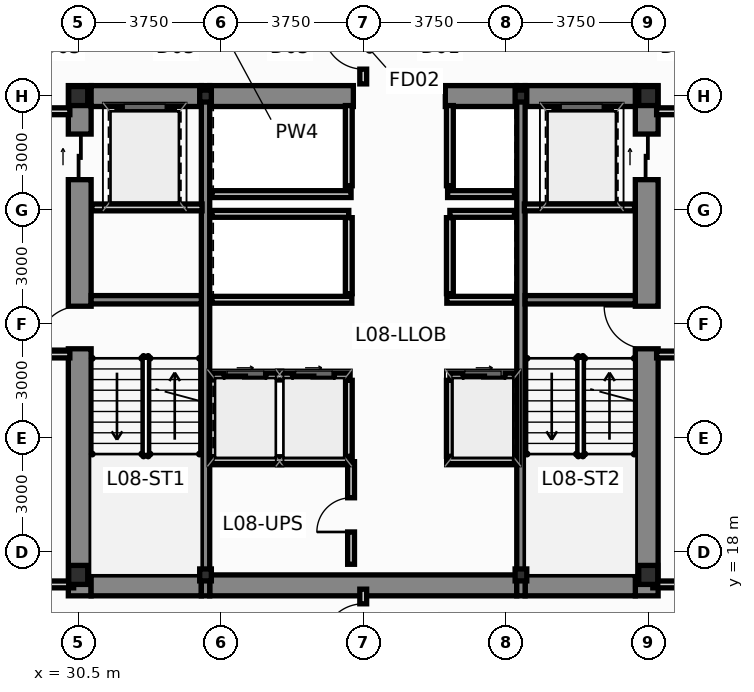
"""IFC4 building model, lengths in metres.
Left out: names, types, materials, properties, quantities, classifications, styles, units other than length and angle.
Written with IfcOpenShell. Run it as: python <this file> out.ifc"""

import sys

from ifc_helpers import new_model, si_unit, direction, frame, frame_2d, origin, origin_2d, place, context, subcontext, project, spatial, rectangle, i_section, extrude, source, transform, mapped, element, fill, save


model = new_model("IFC4")
c1 = context("Model", 3, precision=1e-05, world=origin(), true_north=direction((0.0, 1.0)))
c2 = subcontext(c1, "Body", "Model", "MODEL_VIEW")
j1 = project(units=[si_unit("LENGTHUNIT", "METRE"), si_unit("PLANEANGLEUNIT", "RADIAN")], contexts=[c1])
p1 = place(None, origin())
s1 = spatial("IfcSite", under=j1, at=p1, CompositionType="ELEMENT")
p2 = place(p1, origin())
s2 = spatial("IfcBuilding", under=s1, at=p2, CompositionType="ELEMENT")
p3 = place(p2, frame((0.0, 0.0, 34.9)))
s3 = spatial("IfcBuildingStorey", under=s2, at=p3, CompositionType="ELEMENT", Elevation=34.9)
m1 = source(origin(), c2, "Body", "SweptSolid", [
    extrude(i_section(OverallWidth=0.5, OverallDepth=0.5, WebThickness=0.028, FlangeThickness=0.04, at=origin_2d()), origin(), (0.0, 0.0, 1.0), 3.65),
])
for number, where, z_axis, x_axis in (
    (1, (30.5, 17.4, 0.0), (0.0, 0.0, 1.0), (1.0, 0.0, 0.0)),
    (2, (45.5, 17.4, 0.0), (0.0, 0.0, 1.0), (1.0, 0.0, 0.0)),
    (3, (45.5, 30.0, 0.0), (0.0, 0.0, 1.0), (1.0, 0.0, 0.0)),
    (4, (30.5, 30.0, 0.0), (0.0, 0.0, 1.0), (1.0, 0.0, 0.0)),
):
    element("IfcColumn", number, at=place(p3, frame(where, z_axis=z_axis, x_axis=x_axis)), inside=s3, PredefinedType="COLUMN", context=c2, shape_type="MappedRepresentation", body=[
        mapped(m1, transform((0.0, 0.0, 0.0), scale=1.0)),
    ])
m2 = source(origin(), c2, "Body", "SweptSolid", [
    extrude(i_section(OverallWidth=0.307, OverallDepth=0.315, WebThickness=0.012, FlangeThickness=0.019, at=origin_2d()), origin(), (0.0, 0.0, 1.0), 3.65),
])
for number, where, z_axis, x_axis in (
    (5, (33.85, 17.4, 0.0), (0.0, 0.0, 1.0), (1.0, 0.0, 0.0)),
    (6, (42.15, 17.4, 0.0), (0.0, 0.0, 1.0), (1.0, 0.0, 0.0)),
    (7, (33.85, 30.0, 0.0), (0.0, 0.0, 1.0), (1.0, 0.0, 0.0)),
    (8, (42.15, 30.0, 0.0), (0.0, 0.0, 1.0), (1.0, 0.0, 0.0)),
):
    element("IfcColumn", number, at=place(p3, frame(where, z_axis=z_axis, x_axis=x_axis)), inside=s3, PredefinedType="COLUMN", context=c2, shape_type="MappedRepresentation", body=[
        mapped(m2, transform((0.0, 0.0, 0.0), scale=1.0)),
    ])
p4 = place(p3, frame((30.54, 16.85, 0.0), z_axis=(0.0, 0.0, 1.0), x_axis=(0.0, 1.0, 0.0)))
e9 = element("IfcWall", 9, at=p4, inside=s3, PredefinedType="SHEAR", context=c2, shape_type="SweptSolid", body=[
    extrude(rectangle(XDim=13.425, YDim=0.6, at=frame_2d((6.712, 0.0))), origin(), (0.0, 0.0, 1.0), 3.65),
])
p5 = place(p4, frame((6.5, 0.0, 0.0)))
e10 = element("IfcOpeningElement", 10, at=p5, cuts=e9, PredefinedType="OPENING", context=c2, shape_type="SweptSolid", body=[
    extrude(rectangle(XDim=1.12, YDim=2.15, at=frame_2d((0.56, 1.075))), frame((0.0, 0.312, 0.0), z_axis=(0.0, -1.0, 0.0), x_axis=(1.0, 0.0, 0.0)), (0.0, 0.0, 1.0), 0.624),
])
p6 = place(p4, frame((10.95, 0.0, 0.0)))
e11 = element("IfcOpeningElement", 11, at=p6, cuts=e9, PredefinedType="OPENING", context=c2, shape_type="SweptSolid", body=[
    extrude(rectangle(XDim=1.2, YDim=2.2, at=frame_2d((0.6, 1.1))), frame((0.0, 0.312, 0.0), z_axis=(0.0, -1.0, 0.0), x_axis=(1.0, 0.0, 0.0)), (0.0, 0.0, 1.0), 0.624),
])
p7 = place(p3, frame((45.46, 16.85, 0.0), z_axis=(0.0, 0.0, 1.0), x_axis=(0.0, 1.0, 0.0)))
e12 = element("IfcWall", 12, at=p7, inside=s3, PredefinedType="SHEAR", context=c2, shape_type="SweptSolid", body=[
    extrude(rectangle(XDim=13.425, YDim=0.6, at=frame_2d((6.712, 0.0))), origin(), (0.0, 0.0, 1.0), 3.65),
])
p8 = place(p7, frame((6.5, 0.0, 0.0)))
e13 = element("IfcOpeningElement", 13, at=p8, cuts=e12, PredefinedType="OPENING", context=c2, shape_type="SweptSolid", body=[
    extrude(rectangle(XDim=1.12, YDim=2.15, at=frame_2d((0.56, 1.075))), frame((0.0, 0.312, 0.0), z_axis=(0.0, -1.0, 0.0), x_axis=(1.0, 0.0, 0.0)), (0.0, 0.0, 1.0), 0.624),
])
p9 = place(p7, frame((10.95, 0.0, 0.0)))
e14 = element("IfcOpeningElement", 14, at=p9, cuts=e12, PredefinedType="OPENING", context=c2, shape_type="SweptSolid", body=[
    extrude(rectangle(XDim=1.2, YDim=2.2, at=frame_2d((0.6, 1.1))), frame((0.0, 0.312, 0.0), z_axis=(0.0, -1.0, 0.0), x_axis=(1.0, 0.0, 0.0)), (0.0, 0.0, 1.0), 0.624),
])
p10 = place(p3, frame((30.84, 17.125, 0.0), z_axis=(0.0, 0.0, 1.0), x_axis=(1.0, 0.0, 0.0)))
e15 = element("IfcWall", 15, at=p10, inside=s3, PredefinedType="SHEAR", context=c2, shape_type="SweptSolid", body=[
    extrude(rectangle(XDim=2.9, YDim=0.55, at=frame_2d((1.45, 0.0))), origin(), (0.0, 0.0, 1.0), 3.65),
])
p11 = place(p3, frame((33.96, 17.125, 0.0), z_axis=(0.0, 0.0, 1.0), x_axis=(1.0, 0.0, 0.0)))
e16 = element("IfcWall", 16, at=p11, inside=s3, PredefinedType="SHEAR", context=c2, shape_type="SweptSolid", body=[
    extrude(rectangle(XDim=8.08, YDim=0.55, at=frame_2d((4.04, 0.0))), origin(), (0.0, 0.0, 1.0), 3.65),
])
for number, where, z_axis, x_axis in (
    (17, (42.26, 17.125, 0.0), (0.0, 0.0, 1.0), (1.0, 0.0, 0.0)),
    (18, (30.84, 30.0, 0.0), (0.0, 0.0, 1.0), (1.0, 0.0, 0.0)),
):
    element("IfcWall", number, at=place(p3, frame(where, z_axis=z_axis, x_axis=x_axis)), inside=s3, PredefinedType="SHEAR", context=c2, shape_type="SweptSolid", body=[
        extrude(rectangle(XDim=2.9, YDim=0.55, at=frame_2d((1.45, 0.0))), origin(), (0.0, 0.0, 1.0), 3.65),
    ])
p12 = place(p3, frame((33.96, 30.0, 0.0), z_axis=(0.0, 0.0, 1.0), x_axis=(1.0, 0.0, 0.0)))
e19 = element("IfcWall", 19, at=p12, inside=s3, PredefinedType="SHEAR", context=c2, shape_type="SweptSolid", body=[
    extrude(rectangle(XDim=3.78, YDim=0.55, at=frame_2d((1.89, 0.0))), origin(), (0.0, 0.0, 1.0), 3.65),
])
p13 = place(p3, frame((40.16, 30.0, 0.0), z_axis=(0.0, 0.0, 1.0), x_axis=(1.0, 0.0, 0.0)))
e20 = element("IfcWall", 20, at=p13, inside=s3, PredefinedType="SHEAR", context=c2, shape_type="SweptSolid", body=[
    extrude(rectangle(XDim=1.88, YDim=0.55, at=frame_2d((0.94, 0.0))), origin(), (0.0, 0.0, 1.0), 3.65),
])
p14 = place(p3, frame((42.26, 30.0, 0.0), z_axis=(0.0, 0.0, 1.0), x_axis=(1.0, 0.0, 0.0)))
e21 = element("IfcWall", 21, at=p14, inside=s3, PredefinedType="SHEAR", context=c2, shape_type="SweptSolid", body=[
    extrude(rectangle(XDim=2.9, YDim=0.55, at=frame_2d((1.45, 0.0))), origin(), (0.0, 0.0, 1.0), 3.65),
])
for number, where, z_axis, x_axis in (
    (22, (33.85, 16.85, 0.0), (0.0, 0.0, 1.0), (0.0, 1.0, 0.0)),
    (23, (42.15, 16.85, 0.0), (0.0, 0.0, 1.0), (0.0, 1.0, 0.0)),
):
    element("IfcWall", number, at=place(p3, frame(where, z_axis=z_axis, x_axis=x_axis)), inside=s3, PredefinedType="SHEAR", context=c2, shape_type="SweptSolid", body=[
        extrude(rectangle(XDim=13.425, YDim=0.22, at=frame_2d((6.712, 0.0))), origin(), (0.0, 0.0, 1.0), 3.65),
    ])
for number, where, z_axis, x_axis in (
    (24, (30.84, 24.64, 0.0), (0.0, 0.0, 1.0), (1.0, 0.0, 0.0)),
    (25, (42.26, 24.64, 0.0), (0.0, 0.0, 1.0), (1.0, 0.0, 0.0)),
):
    element("IfcWall", number, at=place(p3, frame(where, z_axis=z_axis, x_axis=x_axis)), inside=s3, PredefinedType="SHEAR", context=c2, shape_type="SweptSolid", body=[
        extrude(rectangle(XDim=2.9, YDim=0.22, at=frame_2d((1.45, 0.0))), origin(), (0.0, 0.0, 1.0), 3.65),
    ])
p15 = place(p3, frame((34.02, 22.62, 0.0), z_axis=(0.0, 0.0, 1.0), x_axis=(1.0, 0.0, 0.0)))
e26 = element("IfcWall", 26, at=p15, inside=s3, PredefinedType="PARTITIONING", context=c2, shape_type="SweptSolid", body=[
    extrude(rectangle(XDim=3.6, YDim=0.18, at=frame_2d((1.8, 0.0))), origin(), (0.0, 0.0, 1.0), 3.4),
])
p16 = place(p15, frame((0.32, 0.0, 0.0)))
e27 = element("IfcOpeningElement", 27, at=p16, cuts=e26, PredefinedType="OPENING", context=c2, shape_type="SweptSolid", body=[
    extrude(rectangle(XDim=1.1, YDim=2.2, at=frame_2d((0.55, 1.1))), frame((0.0, 0.102, 0.0), z_axis=(0.0, -1.0, 0.0), x_axis=(1.0, 0.0, 0.0)), (0.0, 0.0, 1.0), 0.204),
])
p17 = place(p15, frame((2.12, 0.0, 0.0)))
e28 = element("IfcOpeningElement", 28, at=p17, cuts=e26, PredefinedType="OPENING", context=c2, shape_type="SweptSolid", body=[
    extrude(rectangle(XDim=1.1, YDim=2.2, at=frame_2d((0.55, 1.1))), frame((0.0, 0.102, 0.0), z_axis=(0.0, -1.0, 0.0), x_axis=(1.0, 0.0, 0.0)), (0.0, 0.0, 1.0), 0.204),
])
p18 = place(p3, frame((40.28, 22.62, 0.0), z_axis=(0.0, 0.0, 1.0), x_axis=(1.0, 0.0, 0.0)))
e29 = element("IfcWall", 29, at=p18, inside=s3, PredefinedType="PARTITIONING", context=c2, shape_type="SweptSolid", body=[
    extrude(rectangle(XDim=1.7, YDim=0.18, at=frame_2d((0.85, 0.0))), origin(), (0.0, 0.0, 1.0), 3.4),
])
p19 = place(p18, frame((0.35, 0.0, 0.0)))
e30 = element("IfcOpeningElement", 30, at=p19, cuts=e29, PredefinedType="OPENING", context=c2, shape_type="SweptSolid", body=[
    extrude(rectangle(XDim=1.1, YDim=2.2, at=frame_2d((0.55, 1.1))), frame((0.0, 0.102, 0.0), z_axis=(0.0, -1.0, 0.0), x_axis=(1.0, 0.0, 0.0)), (0.0, 0.0, 1.0), 0.204),
])
for number, where, z_axis, x_axis in (
    (31, (37.62, 20.52, 0.0), (0.0, 0.0, 1.0), (0.0, 1.0, 0.0)),
    (32, (40.28, 20.52, 0.0), (0.0, 0.0, 1.0), (0.0, 1.0, 0.0)),
):
    element("IfcWall", number, at=place(p3, frame(where, z_axis=z_axis, x_axis=x_axis)), inside=s3, PredefinedType="PARTITIONING", context=c2, shape_type="SweptSolid", body=[
        extrude(rectangle(XDim=2.0, YDim=0.18, at=frame_2d((1.0, 0.0))), origin(), (0.0, 0.0, 1.0), 3.4),
    ])
p20 = place(p3, frame((34.02, 26.9, 0.0), z_axis=(0.0, 0.0, 1.0), x_axis=(1.0, 0.0, 0.0)))
e33 = element("IfcWall", 33, at=p20, inside=s3, PredefinedType="PARTITIONING", context=c2, shape_type="SweptSolid", body=[
    extrude(rectangle(XDim=3.6, YDim=0.18, at=frame_2d((1.8, 0.0))), origin(), (0.0, 0.0, 1.0), 3.4),
])
p21 = place(p3, frame((40.28, 26.9, 0.0), z_axis=(0.0, 0.0, 1.0), x_axis=(1.0, 0.0, 0.0)))
e34 = element("IfcWall", 34, at=p21, inside=s3, PredefinedType="PARTITIONING", context=c2, shape_type="SweptSolid", body=[
    extrude(rectangle(XDim=1.7, YDim=0.18, at=frame_2d((0.85, 0.0))), origin(), (0.0, 0.0, 1.0), 3.4),
])
for number, where, z_axis, x_axis in (
    (35, (37.62, 24.8, 0.0), (0.0, 0.0, 1.0), (0.0, 1.0, 0.0)),
    (36, (40.28, 24.8, 0.0), (0.0, 0.0, 1.0), (0.0, 1.0, 0.0)),
):
    element("IfcWall", number, at=place(p3, frame(where, z_axis=z_axis, x_axis=x_axis)), inside=s3, PredefinedType="PARTITIONING", context=c2, shape_type="SweptSolid", body=[
        extrude(rectangle(XDim=2.0, YDim=0.18, at=frame_2d((1.0, 0.0))), origin(), (0.0, 0.0, 1.0), 3.4),
    ])
p22 = place(p3, frame((34.02, 24.64, 0.0), z_axis=(0.0, 0.0, 1.0), x_axis=(1.0, 0.0, 0.0)))
e37 = element("IfcWall", 37, at=p22, inside=s3, PredefinedType="PARTITIONING", context=c2, shape_type="SweptSolid", body=[
    extrude(rectangle(XDim=3.68, YDim=0.18, at=frame_2d((1.84, 0.0))), origin(), (0.0, 0.0, 1.0), 3.4),
])
p23 = place(p3, frame((40.2, 24.64, 0.0), z_axis=(0.0, 0.0, 1.0), x_axis=(1.0, 0.0, 0.0)))
e38 = element("IfcWall", 38, at=p23, inside=s3, PredefinedType="PARTITIONING", context=c2, shape_type="SweptSolid", body=[
    extrude(rectangle(XDim=1.78, YDim=0.18, at=frame_2d((0.89, 0.0))), origin(), (0.0, 0.0, 1.0), 3.4),
])
p24 = place(p3, frame((34.02, 27.42, 0.0), z_axis=(0.0, 0.0, 1.0), x_axis=(1.0, 0.0, 0.0)))
e39 = element("IfcWall", 39, at=p24, inside=s3, PredefinedType="PARTITIONING", context=c2, shape_type="SweptSolid", body=[
    extrude(rectangle(XDim=3.66, YDim=0.18, at=frame_2d((1.83, 0.0))), origin(), (0.0, 0.0, 1.0), 3.4),
])
p25 = place(p3, frame((40.22, 27.42, 0.0), z_axis=(0.0, 0.0, 1.0), x_axis=(1.0, 0.0, 0.0)))
e40 = element("IfcWall", 40, at=p25, inside=s3, PredefinedType="PARTITIONING", context=c2, shape_type="SweptSolid", body=[
    extrude(rectangle(XDim=1.76, YDim=0.18, at=frame_2d((0.88, 0.0))), origin(), (0.0, 0.0, 1.0), 3.4),
])
for number, where, z_axis, x_axis in (
    (41, (37.62, 27.64, 0.0), (0.0, 0.0, 1.0), (0.0, 1.0, 0.0)),
    (42, (40.28, 27.64, 0.0), (0.0, 0.0, 1.0), (0.0, 1.0, 0.0)),
):
    element("IfcWall", number, at=place(p3, frame(where, z_axis=z_axis, x_axis=x_axis)), inside=s3, PredefinedType="PARTITIONING", context=c2, shape_type="SweptSolid", body=[
        extrude(rectangle(XDim=2.11, YDim=0.18, at=frame_2d((1.055, 0.0))), origin(), (0.0, 0.0, 1.0), 3.4),
    ])
p26 = place(p3, frame((27.52, 23.2, 0.0), z_axis=(0.0, 0.0, 1.0), x_axis=(1.0, 0.0, 0.0)))
e43 = element("IfcWall", 43, at=p26, inside=s3, PredefinedType="PARTITIONING", context=c2, shape_type="SweptSolid", body=[
    extrude(rectangle(XDim=2.76, YDim=0.18, at=frame_2d((1.38, 0.0))), origin(), (0.0, 0.0, 1.0), 3.4),
])
p27 = place(p3, frame((27.52, 29.6, 0.0), z_axis=(0.0, 0.0, 1.0), x_axis=(1.0, 0.0, 0.0)))
e44 = element("IfcWall", 44, at=p27, inside=s3, PredefinedType="PARTITIONING", context=c2, shape_type="SweptSolid", body=[
    extrude(rectangle(XDim=2.76, YDim=0.18, at=frame_2d((1.38, 0.0))), origin(), (0.0, 0.0, 1.0), 2.783),
])
p28 = place(p3, frame((45.72, 23.2, 0.0), z_axis=(0.0, 0.0, 1.0), x_axis=(1.0, 0.0, 0.0)))
e45 = element("IfcWall", 45, at=p28, inside=s3, PredefinedType="PARTITIONING", context=c2, shape_type="SweptSolid", body=[
    extrude(rectangle(XDim=2.76, YDim=0.18, at=frame_2d((1.38, 0.0))), origin(), (0.0, 0.0, 1.0), 3.4),
])
p29 = place(p3, frame((45.72, 29.6, 0.0), z_axis=(0.0, 0.0, 1.0), x_axis=(1.0, 0.0, 0.0)))
e46 = element("IfcWall", 46, at=p29, inside=s3, PredefinedType="PARTITIONING", context=c2, shape_type="SweptSolid", body=[
    extrude(rectangle(XDim=2.76, YDim=0.18, at=frame_2d((1.38, 0.0))), origin(), (0.0, 0.0, 1.0), 2.783),
])
for number, where, z_axis, x_axis in (
    (47, (30.86, 27.07, 0.0), (0.0, 0.0, 1.0), (1.0, 0.0, 0.0)),
    (48, (42.24, 27.07, 0.0), (0.0, 0.0, 1.0), (1.0, 0.0, 0.0)),
):
    element("IfcWall", number, at=place(p3, frame(where, z_axis=z_axis, x_axis=x_axis)), inside=s3, PredefinedType="PARTITIONING", context=c2, shape_type="SweptSolid", body=[
        extrude(rectangle(XDim=2.9, YDim=0.18, at=frame_2d((1.45, 0.0))), origin(), (0.0, 0.0, 1.0), 3.4),
    ])
p30 = place(p3, frame((34.02, 20.42, 0.0), z_axis=(0.0, 0.0, 1.0), x_axis=(1.0, 0.0, 0.0)))
e49 = element("IfcWall", 49, at=p30, inside=s3, PredefinedType="PARTITIONING", context=c2, shape_type="SweptSolid", body=[
    extrude(rectangle(XDim=3.64, YDim=0.18, at=frame_2d((1.82, 0.0))), origin(), (0.0, 0.0, 1.0), 3.4),
])
p31 = place(p3, frame((40.22, 20.42, 0.0), z_axis=(0.0, 0.0, 1.0), x_axis=(1.0, 0.0, 0.0)))
e50 = element("IfcWall", 50, at=p31, inside=s3, PredefinedType="PARTITIONING", context=c2, shape_type="SweptSolid", body=[
    extrude(rectangle(XDim=1.76, YDim=0.18, at=frame_2d((0.88, 0.0))), origin(), (0.0, 0.0, 1.0), 3.4),
])
p32 = place(p3, frame((37.68, 17.68, 0.0), z_axis=(0.0, 0.0, 1.0), x_axis=(0.0, 1.0, 0.0)))
e51 = element("IfcWall", 51, at=p32, inside=s3, PredefinedType="PARTITIONING", context=c2, shape_type="SweptSolid", body=[
    extrude(rectangle(XDim=2.7, YDim=0.18, at=frame_2d((1.35, 0.0))), origin(), (0.0, 0.0, 1.0), 3.4),
])
p33 = place(p32, frame((0.85, 0.0, 0.0)))
e52 = element("IfcOpeningElement", 52, at=p33, cuts=e51, PredefinedType="OPENING", context=c2, shape_type="SweptSolid", body=[
    extrude(rectangle(XDim=0.9, YDim=2.1, at=frame_2d((0.45, 1.05))), frame((0.0, 0.102, 0.0), z_axis=(0.0, -1.0, 0.0), x_axis=(1.0, 0.0, 0.0)), (0.0, 0.0, 1.0), 0.204),
])
for number, where, z_axis, x_axis in (
    (53, (27.48, 17.15, 0.0), (0.0, 0.0, 1.0), (1.0, 0.0, 0.0)),
    (54, (45.62, 17.15, 0.0), (0.0, 0.0, 1.0), (1.0, 0.0, 0.0)),
):
    element("IfcWall", number, at=place(p3, frame(where, z_axis=z_axis, x_axis=x_axis)), inside=s3, PredefinedType="PARTITIONING", context=c2, shape_type="SweptSolid", body=[
        extrude(rectangle(XDim=2.9, YDim=0.18, at=frame_2d((1.45, 0.0))), origin(), (0.0, 0.0, 1.0), 2.783),
    ])
p34 = place(p3, frame((38.0, 15.205, 0.0), z_axis=(0.0, 0.0, 1.0), x_axis=(0.0, 1.0, 0.0)))
e55 = element("IfcWall", 55, at=p34, inside=s3, PredefinedType="PARTITIONING", context=c2, shape_type="SweptSolid", body=[
    extrude(rectangle(XDim=1.82, YDim=0.18, at=frame_2d((0.91, 0.0))), origin(), (0.0, 0.0, 1.0), 3.4),
])
p35 = place(p34, frame((0.385, 0.0, 0.0)))
e56 = element("IfcOpeningElement", 56, at=p35, cuts=e55, PredefinedType="OPENING", context=c2, shape_type="SweptSolid", body=[
    extrude(rectangle(XDim=1.05, YDim=2.15, at=frame_2d((0.525, 1.075))), frame((0.0, 0.102, 0.0), z_axis=(0.0, -1.0, 0.0), x_axis=(1.0, 0.0, 0.0)), (0.0, 0.0, 1.0), 0.204),
])
p36 = place(p3, frame((38.0, 30.32, 0.0), z_axis=(0.0, 0.0, 1.0), x_axis=(0.0, 1.0, 0.0)))
e57 = element("IfcWall", 57, at=p36, inside=s3, PredefinedType="PARTITIONING", context=c2, shape_type="SweptSolid", body=[
    extrude(rectangle(XDim=1.825, YDim=0.18, at=frame_2d((0.913, 0.0))), origin(), (0.0, 0.0, 1.0), 3.4),
])
p37 = place(p36, frame((0.388, 0.0, 0.0)))
e58 = element("IfcOpeningElement", 58, at=p37, cuts=e57, PredefinedType="OPENING", context=c2, shape_type="SweptSolid", body=[
    extrude(rectangle(XDim=1.05, YDim=2.15, at=frame_2d((0.525, 1.075))), frame((0.0, 0.102, 0.0), z_axis=(0.0, -1.0, 0.0), x_axis=(1.0, 0.0, 0.0)), (0.0, 0.0, 1.0), 0.204),
])
p38 = place(p5, origin())
e59 = element("IfcDoor", 59, at=p38, inside=s3, OperationType="SINGLE_SWING_LEFT", PredefinedType="DOOR", context=c2, shape_type="SweptSolid", body=[
    extrude(rectangle(XDim=1.12, YDim=2.15, at=frame_2d((0.56, 1.075))), frame((0.0, 0.025, 0.0), z_axis=(0.0, -1.0, 0.0), x_axis=(1.0, 0.0, 0.0)), (0.0, 0.0, 1.0), 0.05),
])
fill(e10, e59)
p39 = place(p6, origin())
e60 = element("IfcDoor", 60, at=p39, inside=s3, OperationType="SLIDING_TO_LEFT", PredefinedType="DOOR", context=c2, shape_type="SweptSolid", body=[
    extrude(rectangle(XDim=1.2, YDim=2.2, at=frame_2d((0.6, 1.1))), frame((0.0, 0.025, 0.0), z_axis=(0.0, -1.0, 0.0), x_axis=(1.0, 0.0, 0.0)), (0.0, 0.0, 1.0), 0.05),
])
fill(e11, e60)
p40 = place(p8, origin())
e61 = element("IfcDoor", 61, at=p40, inside=s3, OperationType="SINGLE_SWING_RIGHT", PredefinedType="DOOR", context=c2, shape_type="SweptSolid", body=[
    extrude(rectangle(XDim=1.12, YDim=2.15, at=frame_2d((0.56, 1.075))), frame((0.0, 0.025, 0.0), z_axis=(0.0, -1.0, 0.0), x_axis=(1.0, 0.0, 0.0)), (0.0, 0.0, 1.0), 0.05),
])
fill(e13, e61)
p41 = place(p9, origin())
e62 = element("IfcDoor", 62, at=p41, inside=s3, OperationType="SLIDING_TO_RIGHT", PredefinedType="DOOR", context=c2, shape_type="SweptSolid", body=[
    extrude(rectangle(XDim=1.2, YDim=2.2, at=frame_2d((0.6, 1.1))), frame((0.0, 0.025, 0.0), z_axis=(0.0, -1.0, 0.0), x_axis=(1.0, 0.0, 0.0)), (0.0, 0.0, 1.0), 0.05),
])
fill(e14, e62)
p42 = place(p16, origin())
e63 = element("IfcDoor", 63, at=p42, inside=s3, OperationType="SLIDING_TO_LEFT", PredefinedType="DOOR", context=c2, shape_type="SweptSolid", body=[
    extrude(rectangle(XDim=1.1, YDim=2.2, at=frame_2d((0.55, 1.1))), frame((0.0, 0.025, 0.0), z_axis=(0.0, -1.0, 0.0), x_axis=(1.0, 0.0, 0.0)), (0.0, 0.0, 1.0), 0.05),
])
fill(e27, e63)
p43 = place(p17, origin())
e64 = element("IfcDoor", 64, at=p43, inside=s3, OperationType="SLIDING_TO_RIGHT", PredefinedType="DOOR", context=c2, shape_type="SweptSolid", body=[
    extrude(rectangle(XDim=1.1, YDim=2.2, at=frame_2d((0.55, 1.1))), frame((0.0, 0.025, 0.0), z_axis=(0.0, -1.0, 0.0), x_axis=(1.0, 0.0, 0.0)), (0.0, 0.0, 1.0), 0.05),
])
fill(e28, e64)
p44 = place(p19, origin())
e65 = element("IfcDoor", 65, at=p44, inside=s3, OperationType="SLIDING_TO_LEFT", PredefinedType="DOOR", context=c2, shape_type="SweptSolid", body=[
    extrude(rectangle(XDim=1.1, YDim=2.2, at=frame_2d((0.55, 1.1))), frame((0.0, 0.025, 0.0), z_axis=(0.0, -1.0, 0.0), x_axis=(1.0, 0.0, 0.0)), (0.0, 0.0, 1.0), 0.05),
])
fill(e30, e65)
p45 = place(p33, origin())
e66 = element("IfcDoor", 66, at=p45, inside=s3, OperationType="SINGLE_SWING_LEFT", PredefinedType="DOOR", context=c2, shape_type="SweptSolid", body=[
    extrude(rectangle(XDim=0.9, YDim=2.1, at=frame_2d((0.45, 1.05))), frame((0.0, 0.025, 0.0), z_axis=(0.0, -1.0, 0.0), x_axis=(1.0, 0.0, 0.0)), (0.0, 0.0, 1.0), 0.05),
])
fill(e52, e66)
p46 = place(p35, origin())
e67 = element("IfcDoor", 67, at=p46, inside=s3, OperationType="SINGLE_SWING_LEFT", PredefinedType="DOOR", context=c2, shape_type="SweptSolid", body=[
    extrude(rectangle(XDim=1.05, YDim=2.15, at=frame_2d((0.525, 1.075))), frame((0.0, 0.025, 0.0), z_axis=(0.0, -1.0, 0.0), x_axis=(1.0, 0.0, 0.0)), (0.0, 0.0, 1.0), 0.05),
])
fill(e56, e67)
p47 = place(p37, origin())
e68 = element("IfcDoor", 68, at=p47, inside=s3, OperationType="SINGLE_SWING_RIGHT", PredefinedType="DOOR", context=c2, shape_type="SweptSolid", body=[
    extrude(rectangle(XDim=1.05, YDim=2.15, at=frame_2d((0.525, 1.075))), frame((0.0, 0.025, 0.0), z_axis=(0.0, -1.0, 0.0), x_axis=(1.0, 0.0, 0.0)), (0.0, 0.0, 1.0), 0.05),
])
fill(e58, e68)
save(model, sys.argv[1])
